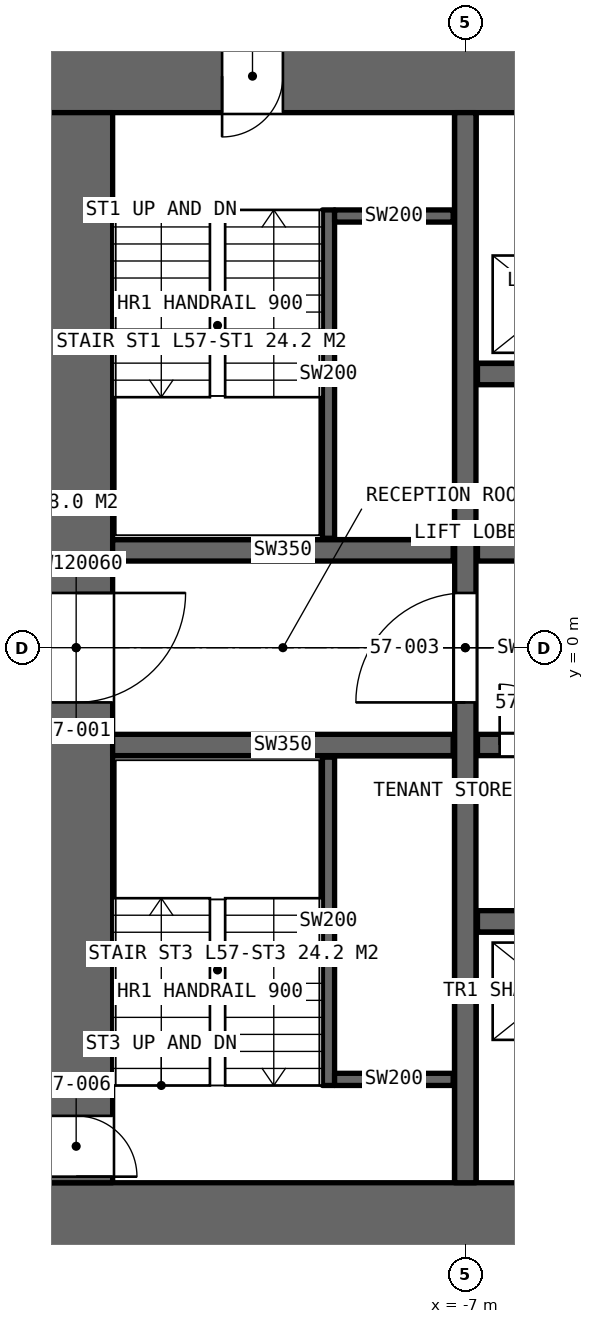
"""IFC4 building model, lengths in metres.
Left out: names, types, materials, properties, quantities, classifications, styles, units other than length and angle.
Written with IfcOpenShell. Run it as: python <this file> out.ifc"""

import sys

from ifc_helpers import new_model, si_unit, direction, frame, frame_2d, origin, place, context, subcontext, project, spatial, rectangle, extrude, element, fill, save


model = new_model("IFC4")
c1 = context("Model", 3, precision=1e-05, world=origin(), true_north=direction((0.0, 1.0)))
c2 = subcontext(c1, "Body", "Model", "MODEL_VIEW")
j1 = project(units=[si_unit("LENGTHUNIT", "METRE"), si_unit("PLANEANGLEUNIT", "RADIAN")], contexts=[c1])
p1 = place(None, origin())
s1 = spatial("IfcSite", under=j1, at=p1, CompositionType="ELEMENT")
p2 = place(p1, origin())
s2 = spatial("IfcBuilding", under=s1, at=p2, CompositionType="ELEMENT")
p3 = place(p2, frame((0.0, 0.0, 257.8)))
s3 = spatial("IfcBuildingStorey", under=s2, at=p3, CompositionType="ELEMENT", Elevation=257.8)
p4 = place(p3, frame((-14.0, -9.4, 0.0), z_axis=(0.0, 0.0, 1.0), x_axis=(1.0, 0.0, 0.0)))
e1 = element("IfcWall", 1, at=p4, inside=s3, PredefinedType="SHEAR", context=c2, shape_type="SweptSolid", body=[
    extrude(rectangle(XDim=28.0, YDim=1.2, at=frame_2d((14.0, 0.0))), origin(), (0.0, 0.0, 1.0), 4.2),
])
p5 = place(p4, frame((22.9, 0.0, 0.0)))
e2 = element("IfcOpeningElement", 2, at=p5, cuts=e1, PredefinedType="OPENING", context=c2, shape_type="SweptSolid", body=[
    extrude(rectangle(XDim=2.2, YDim=2.7, at=frame_2d((1.1, 1.35))), frame((0.0, 0.61, 0.0), z_axis=(0.0, -1.0, 0.0), x_axis=(1.0, 0.0, 0.0)), (0.0, 0.0, 1.0), 1.22),
])
p6 = place(p3, frame((14.0, 9.4, 0.0), z_axis=(0.0, 0.0, 1.0), x_axis=(-1.0, 0.0, 0.0)))
e3 = element("IfcWall", 3, at=p6, inside=s3, PredefinedType="SHEAR", context=c2, shape_type="SweptSolid", body=[
    extrude(rectangle(XDim=28.0, YDim=1.2, at=frame_2d((14.0, 0.0))), origin(), (0.0, 0.0, 1.0), 4.2),
])
p7 = place(p6, frame((24.0, 0.0, 0.0)))
e4 = element("IfcOpeningElement", 4, at=p7, cuts=e3, PredefinedType="OPENING", context=c2, shape_type="SweptSolid", body=[
    extrude(rectangle(XDim=1.0, YDim=2.4, at=frame_2d((0.5, 1.2))), frame((0.0, 0.61, 0.0), z_axis=(0.0, -1.0, 0.0), x_axis=(1.0, 0.0, 0.0)), (0.0, 0.0, 1.0), 1.22),
])
p8 = place(p3, frame((-13.4, 8.8, 0.0), z_axis=(0.0, 0.0, 1.0), x_axis=(0.0, -1.0, 0.0)))
e5 = element("IfcWall", 5, at=p8, inside=s3, PredefinedType="SHEAR", context=c2, shape_type="SweptSolid", body=[
    extrude(rectangle(XDim=17.6, YDim=1.2, at=frame_2d((8.8, 0.0))), origin(), (0.0, 0.0, 1.0), 4.2),
])
p9 = place(p8, frame((7.9, 0.0, 0.0)))
e6 = element("IfcOpeningElement", 6, at=p9, cuts=e5, PredefinedType="OPENING", context=c2, shape_type="SweptSolid", body=[
    extrude(rectangle(XDim=1.8, YDim=2.4, at=frame_2d((0.9, 1.2))), frame((0.0, 0.61, 0.0), z_axis=(0.0, -1.0, 0.0), x_axis=(1.0, 0.0, 0.0)), (0.0, 0.0, 1.0), 1.22),
])
p10 = place(p8, frame((16.5, 0.0, 0.0)))
e7 = element("IfcOpeningElement", 7, at=p10, cuts=e5, PredefinedType="OPENING", context=c2, shape_type="SweptSolid", body=[
    extrude(rectangle(XDim=1.0, YDim=2.4, at=frame_2d((0.5, 1.2))), frame((0.0, 0.61, 0.0), z_axis=(0.0, -1.0, 0.0), x_axis=(1.0, 0.0, 0.0)), (0.0, 0.0, 1.0), 1.22),
])
p11 = place(p3, frame((-7.0, -8.8, 0.0), z_axis=(0.0, 0.0, 1.0), x_axis=(0.0, 1.0, 0.0)))
e8 = element("IfcWall", 8, at=p11, inside=s3, PredefinedType="SHEAR", context=c2, shape_type="SweptSolid", body=[
    extrude(rectangle(XDim=17.6, YDim=0.35, at=frame_2d((8.8, 0.0))), origin(), (0.0, 0.0, 1.0), 4.2),
])
p12 = place(p11, frame((7.9, 0.0, 0.0)))
e9 = element("IfcOpeningElement", 9, at=p12, cuts=e8, PredefinedType="OPENING", context=c2, shape_type="SweptSolid", body=[
    extrude(rectangle(XDim=1.8, YDim=2.4, at=frame_2d((0.9, 1.2))), frame((0.0, 0.185, 0.0), z_axis=(0.0, -1.0, 0.0), x_axis=(1.0, 0.0, 0.0)), (0.0, 0.0, 1.0), 0.37),
])
p13 = place(p3, frame((-6.8, 1.6, 0.0), z_axis=(0.0, 0.0, 1.0), x_axis=(1.0, 0.0, 0.0)))
e10 = element("IfcWall", 10, at=p13, inside=s3, PredefinedType="SHEAR", context=c2, shape_type="SweptSolid", body=[
    extrude(rectangle(XDim=13.6, YDim=0.35, at=frame_2d((6.8, 0.0))), origin(), (0.0, 0.0, 1.0), 4.2),
])
p14 = place(p13, frame((11.9, 0.0, 0.0)))
e11 = element("IfcOpeningElement", 11, at=p14, cuts=e10, PredefinedType="OPENING", context=c2, shape_type="SweptSolid", body=[
    extrude(rectangle(XDim=1.0, YDim=2.4, at=frame_2d((0.5, 1.2))), frame((0.0, 0.185, 0.0), z_axis=(0.0, -1.0, 0.0), x_axis=(1.0, 0.0, 0.0)), (0.0, 0.0, 1.0), 0.37),
])
p15 = place(p13, frame((4.5, 0.0, 0.0)))
e12 = element("IfcOpeningElement", 12, at=p15, cuts=e10, PredefinedType="OPENING", context=c2, shape_type="SweptSolid", body=[
    extrude(rectangle(XDim=1.8, YDim=2.4, at=frame_2d((0.9, 1.2))), frame((0.0, 0.185, 0.0), z_axis=(0.0, -1.0, 0.0), x_axis=(1.0, 0.0, 0.0)), (0.0, 0.0, 1.0), 0.37),
])
p16 = place(p3, frame((-6.8, -1.6, 0.0), z_axis=(0.0, 0.0, 1.0), x_axis=(1.0, 0.0, 0.0)))
e13 = element("IfcWall", 13, at=p16, inside=s3, PredefinedType="SHEAR", context=c2, shape_type="SweptSolid", body=[
    extrude(rectangle(XDim=13.6, YDim=0.35, at=frame_2d((6.8, 0.0))), origin(), (0.0, 0.0, 1.0), 4.2),
])
p17 = place(p16, frame((0.365, 0.0, 0.0)))
e14 = element("IfcOpeningElement", 14, at=p17, cuts=e13, PredefinedType="OPENING", context=c2, shape_type="SweptSolid", body=[
    extrude(rectangle(XDim=1.0, YDim=2.4, at=frame_2d((0.5, 1.2))), frame((0.0, 0.185, 0.0), z_axis=(0.0, -1.0, 0.0), x_axis=(1.0, 0.0, 0.0)), (0.0, 0.0, 1.0), 0.37),
])
p18 = place(p16, frame((3.1, 0.0, 0.0)))
e15 = element("IfcOpeningElement", 15, at=p18, cuts=e13, PredefinedType="OPENING", context=c2, shape_type="SweptSolid", body=[
    extrude(rectangle(XDim=1.0, YDim=2.4, at=frame_2d((0.5, 1.2))), frame((0.0, 0.185, 0.0), z_axis=(0.0, -1.0, 0.0), x_axis=(1.0, 0.0, 0.0)), (0.0, 0.0, 1.0), 0.37),
])
p19 = place(p16, frame((6.7, 0.0, 0.0)))
e16 = element("IfcOpeningElement", 16, at=p19, cuts=e13, PredefinedType="OPENING", context=c2, shape_type="SweptSolid", body=[
    extrude(rectangle(XDim=1.0, YDim=2.4, at=frame_2d((0.5, 1.2))), frame((0.0, 0.185, 0.0), z_axis=(0.0, -1.0, 0.0), x_axis=(1.0, 0.0, 0.0)), (0.0, 0.0, 1.0), 0.37),
])
p20 = place(p16, frame((9.485, 0.0, 0.0)))
e17 = element("IfcOpeningElement", 17, at=p20, cuts=e13, PredefinedType="OPENING", context=c2, shape_type="SweptSolid", body=[
    extrude(rectangle(XDim=0.9, YDim=2.4, at=frame_2d((0.45, 1.2))), frame((0.0, 0.185, 0.0), z_axis=(0.0, -1.0, 0.0), x_axis=(1.0, 0.0, 0.0)), (0.0, 0.0, 1.0), 0.37),
])
p21 = place(p16, frame((11.85, 0.0, 0.0)))
e18 = element("IfcOpeningElement", 18, at=p21, cuts=e13, PredefinedType="OPENING", context=c2, shape_type="SweptSolid", body=[
    extrude(rectangle(XDim=1.1, YDim=2.4, at=frame_2d((0.55, 1.2))), frame((0.0, 0.185, 0.0), z_axis=(0.0, -1.0, 0.0), x_axis=(1.0, 0.0, 0.0)), (0.0, 0.0, 1.0), 0.37),
])
p22 = place(p3, frame((-6.8, 4.5, 0.0), z_axis=(0.0, 0.0, 1.0), x_axis=(1.0, 0.0, 0.0)))
e19 = element("IfcWall", 19, at=p22, inside=s3, PredefinedType="SHEAR", context=c2, shape_type="SweptSolid", body=[
    extrude(rectangle(XDim=13.6, YDim=0.35, at=frame_2d((6.8, 0.0))), origin(), (0.0, 0.0, 1.0), 4.2),
])
p23 = place(p22, frame((0.7, 0.0, 0.0)))
e20 = element("IfcOpeningElement", 20, at=p23, cuts=e19, PredefinedType="OPENING", context=c2, shape_type="SweptSolid", body=[
    extrude(rectangle(XDim=1.1, YDim=2.4, at=frame_2d((0.55, 1.2))), frame((0.0, 0.185, 0.0), z_axis=(0.0, -1.0, 0.0), x_axis=(1.0, 0.0, 0.0)), (0.0, 0.0, 1.0), 0.37),
])
p24 = place(p22, frame((3.5, 0.0, 0.0)))
e21 = element("IfcOpeningElement", 21, at=p24, cuts=e19, PredefinedType="OPENING", context=c2, shape_type="SweptSolid", body=[
    extrude(rectangle(XDim=1.1, YDim=2.4, at=frame_2d((0.55, 1.2))), frame((0.0, 0.185, 0.0), z_axis=(0.0, -1.0, 0.0), x_axis=(1.0, 0.0, 0.0)), (0.0, 0.0, 1.0), 0.37),
])
p25 = place(p22, frame((6.3, 0.0, 0.0)))
e22 = element("IfcOpeningElement", 22, at=p25, cuts=e19, PredefinedType="OPENING", context=c2, shape_type="SweptSolid", body=[
    extrude(rectangle(XDim=1.1, YDim=2.4, at=frame_2d((0.55, 1.2))), frame((0.0, 0.185, 0.0), z_axis=(0.0, -1.0, 0.0), x_axis=(1.0, 0.0, 0.0)), (0.0, 0.0, 1.0), 0.37),
])
p26 = place(p22, frame((9.1, 0.0, 0.0)))
e23 = element("IfcOpeningElement", 23, at=p26, cuts=e19, PredefinedType="OPENING", context=c2, shape_type="SweptSolid", body=[
    extrude(rectangle(XDim=1.1, YDim=2.4, at=frame_2d((0.55, 1.2))), frame((0.0, 0.185, 0.0), z_axis=(0.0, -1.0, 0.0), x_axis=(1.0, 0.0, 0.0)), (0.0, 0.0, 1.0), 0.37),
])
p27 = place(p3, frame((-6.8, -4.5, 0.0), z_axis=(0.0, 0.0, 1.0), x_axis=(1.0, 0.0, 0.0)))
e24 = element("IfcWall", 24, at=p27, inside=s3, PredefinedType="SHEAR", context=c2, shape_type="SweptSolid", body=[
    extrude(rectangle(XDim=13.6, YDim=0.35, at=frame_2d((6.8, 0.0))), origin(), (0.0, 0.0, 1.0), 4.2),
])
for number, where, z_axis, x_axis in (
    (25, (-12.8, 1.6, 0.0), (0.0, 0.0, 1.0), (1.0, 0.0, 0.0)),
    (26, (-12.8, -1.6, 0.0), (0.0, 0.0, 1.0), (1.0, 0.0, 0.0)),
):
    element("IfcWall", number, at=place(p3, frame(where, z_axis=z_axis, x_axis=x_axis)), inside=s3, PredefinedType="SHEAR", context=c2, shape_type="SweptSolid", body=[
        extrude(rectangle(XDim=5.6, YDim=0.35, at=frame_2d((2.8, 0.0))), origin(), (0.0, 0.0, 1.0), 4.2),
    ])
p28 = place(p3, frame((-9.25, 7.2, 0.0), z_axis=(0.0, 0.0, 1.0), x_axis=(0.0, -1.0, 0.0)))
e27 = element("IfcWall", 27, at=p28, inside=s3, PredefinedType="SOLIDWALL", context=c2, shape_type="SweptSolid", body=[
    extrude(rectangle(XDim=5.4, YDim=0.2, at=frame_2d((2.7, 0.0))), origin(), (0.0, 0.0, 1.0), 4.2),
])
p29 = place(p3, frame((-9.15, 7.1, 0.0), z_axis=(0.0, 0.0, 1.0), x_axis=(1.0, 0.0, 0.0)))
e28 = element("IfcWall", 28, at=p29, inside=s3, PredefinedType="SOLIDWALL", context=c2, shape_type="SweptSolid", body=[
    extrude(rectangle(XDim=1.95, YDim=0.2, at=frame_2d((0.975, 0.0))), origin(), (0.0, 0.0, 1.0), 4.2),
])
p30 = place(p3, frame((-9.25, -7.2, 0.0), z_axis=(0.0, 0.0, 1.0), x_axis=(0.0, 1.0, 0.0)))
e29 = element("IfcWall", 29, at=p30, inside=s3, PredefinedType="SOLIDWALL", context=c2, shape_type="SweptSolid", body=[
    extrude(rectangle(XDim=5.4, YDim=0.2, at=frame_2d((2.7, 0.0))), origin(), (0.0, 0.0, 1.0), 4.2),
])
p31 = place(p3, frame((-9.15, -7.1, 0.0), z_axis=(0.0, 0.0, 1.0), x_axis=(1.0, 0.0, 0.0)))
e30 = element("IfcWall", 30, at=p31, inside=s3, PredefinedType="SOLIDWALL", context=c2, shape_type="SweptSolid", body=[
    extrude(rectangle(XDim=1.95, YDim=0.2, at=frame_2d((0.975, 0.0))), origin(), (0.0, 0.0, 1.0), 4.2),
])
p32 = place(p9, origin())
e31 = element("IfcDoor", 31, at=p32, inside=s3, OperationType="DOUBLE_DOOR_SINGLE_SWING", PredefinedType="DOOR", context=c2, shape_type="SweptSolid", body=[
    extrude(rectangle(XDim=1.8, YDim=2.4, at=frame_2d((0.9, 1.2))), frame((0.0, 0.025, 0.0), z_axis=(0.0, -1.0, 0.0), x_axis=(1.0, 0.0, 0.0)), (0.0, 0.0, 1.0), 0.05),
])
fill(e6, e31)
p33 = place(p12, origin())
e32 = element("IfcDoor", 32, at=p33, inside=s3, OperationType="DOUBLE_DOOR_SINGLE_SWING", PredefinedType="DOOR", context=c2, shape_type="SweptSolid", body=[
    extrude(rectangle(XDim=1.8, YDim=2.4, at=frame_2d((0.9, 1.2))), frame((0.0, 0.025, 0.0), z_axis=(0.0, -1.0, 0.0), x_axis=(1.0, 0.0, 0.0)), (0.0, 0.0, 1.0), 0.05),
])
fill(e9, e32)
p34 = place(p7, origin())
e33 = element("IfcDoor", 33, at=p34, inside=s3, OperationType="SINGLE_SWING_RIGHT", PredefinedType="DOOR", context=c2, shape_type="SweptSolid", body=[
    extrude(rectangle(XDim=1.0, YDim=2.4, at=frame_2d((0.5, 1.2))), frame((0.0, 0.025, 0.0), z_axis=(0.0, -1.0, 0.0), x_axis=(1.0, 0.0, 0.0)), (0.0, 0.0, 1.0), 0.05),
])
fill(e4, e33)
p35 = place(p10, origin())
e34 = element("IfcDoor", 34, at=p35, inside=s3, OperationType="SINGLE_SWING_RIGHT", PredefinedType="DOOR", context=c2, shape_type="SweptSolid", body=[
    extrude(rectangle(XDim=1.0, YDim=2.4, at=frame_2d((0.5, 1.2))), frame((0.0, 0.025, 0.0), z_axis=(0.0, -1.0, 0.0), x_axis=(1.0, 0.0, 0.0)), (0.0, 0.0, 1.0), 0.05),
])
fill(e7, e34)
p36 = place(p17, origin())
e35 = element("IfcDoor", 35, at=p36, inside=s3, OperationType="SINGLE_SWING_LEFT", PredefinedType="DOOR", context=c2, shape_type="SweptSolid", body=[
    extrude(rectangle(XDim=1.0, YDim=2.4, at=frame_2d((0.5, 1.2))), frame((0.0, 0.025, 0.0), z_axis=(0.0, -1.0, 0.0), x_axis=(1.0, 0.0, 0.0)), (0.0, 0.0, 1.0), 0.05),
])
fill(e14, e35)
save(model, sys.argv[1])
